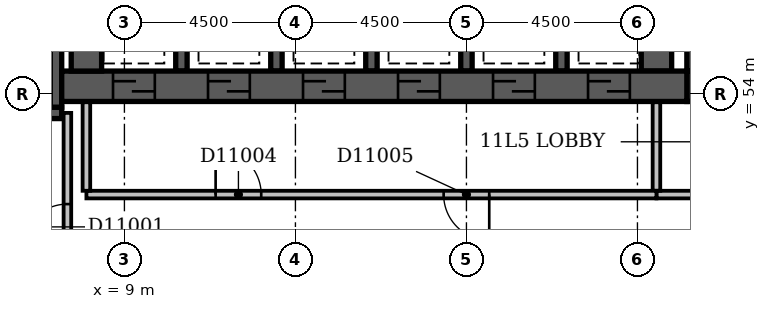
"""IFC4 building model, lengths in metres.
Left out: names, types, materials, properties, quantities, classifications, styles, units other than length and angle.
Written with IfcOpenShell. Run it as: python <this file> out.ifc"""

import sys

from ifc_helpers import new_model, si_unit, direction, frame, frame_2d, origin, place, context, subcontext, project, spatial, rectangle, extrude, element, fill, save


model = new_model("IFC4")
c1 = context("Model", 3, precision=1e-05, world=origin(), true_north=direction((0.0, 1.0)))
c2 = subcontext(c1, "Body", "Model", "MODEL_VIEW")
j1 = project(units=[si_unit("LENGTHUNIT", "METRE"), si_unit("PLANEANGLEUNIT", "RADIAN")], contexts=[c1])
p1 = place(None, origin())
s1 = spatial("IfcSite", under=j1, at=p1, CompositionType="ELEMENT")
p2 = place(p1, origin())
s2 = spatial("IfcBuilding", under=s1, at=p2, CompositionType="ELEMENT")
p3 = place(p2, frame((0.0, 0.0, 50.6)))
s3 = spatial("IfcBuildingStorey", under=s2, at=p3, CompositionType="ELEMENT", Elevation=50.6)
p4 = place(p3, frame((0.35, 53.5, -0.3), z_axis=(0.0, 0.0, 1.0), x_axis=(1.0, 0.0, 0.0)))
e1 = element("IfcWall", 1, at=p4, inside=s3, PredefinedType="SHEAR", context=c2, shape_type="SweptSolid", body=[
    extrude(rectangle(XDim=7.0, YDim=0.3, at=frame_2d((3.5, 0.0))), origin(), (0.0, 0.0, 1.0), 3.6),
])
p5 = place(p4, frame((5.58, 0.0, 0.3)))
e2 = element("IfcOpeningElement", 2, at=p5, cuts=e1, PredefinedType="OPENING", context=c2, shape_type="SweptSolid", body=[
    extrude(rectangle(XDim=1.1, YDim=2.1, at=frame_2d((0.55, 1.05))), frame((0.0, 0.162, 0.0), z_axis=(0.0, -1.0, 0.0), x_axis=(1.0, 0.0, 0.0)), (0.0, 0.0, 1.0), 0.324),
])
p6 = place(p3, frame((7.2, 53.65, -0.3), z_axis=(0.0, 0.0, 1.0), x_axis=(0.0, 1.0, 0.0)))
e3 = element("IfcWall", 3, at=p6, inside=s3, PredefinedType="SHEAR", context=c2, shape_type="SweptSolid", body=[
    extrude(rectangle(XDim=4.2, YDim=0.3, at=frame_2d((2.1, 0.0))), origin(), (0.0, 0.0, 1.0), 3.6),
])
p7 = place(p3, frame((7.35, 54.2, -0.3), z_axis=(0.0, 0.0, 1.0), x_axis=(1.0, 0.0, 0.0)))
e4 = element("IfcWall", 4, at=p7, inside=s3, PredefinedType="SHEAR", context=c2, shape_type="SweptSolid", body=[
    extrude(rectangle(XDim=16.45, YDim=0.8, at=frame_2d((8.225, 0.0))), origin(), (0.0, 0.0, 1.0), 3.6),
])
p8 = place(p7, frame((1.35, 0.0, 0.3)))
e5 = element("IfcOpeningElement", 5, at=p8, cuts=e4, PredefinedType="OPENING", context=c2, shape_type="SweptSolid", body=[
    extrude(rectangle(XDim=1.1, YDim=2.1, at=frame_2d((0.55, 1.05))), frame((0.0, 0.412, 0.0), z_axis=(0.0, -1.0, 0.0), x_axis=(1.0, 0.0, 0.0)), (0.0, 0.0, 1.0), 0.824),
])
p9 = place(p7, frame((3.85, 0.0, 0.3)))
e6 = element("IfcOpeningElement", 6, at=p9, cuts=e4, PredefinedType="OPENING", context=c2, shape_type="SweptSolid", body=[
    extrude(rectangle(XDim=1.1, YDim=2.1, at=frame_2d((0.55, 1.05))), frame((0.0, 0.412, 0.0), z_axis=(0.0, -1.0, 0.0), x_axis=(1.0, 0.0, 0.0)), (0.0, 0.0, 1.0), 0.824),
])
p10 = place(p7, frame((6.35, 0.0, 0.3)))
e7 = element("IfcOpeningElement", 7, at=p10, cuts=e4, PredefinedType="OPENING", context=c2, shape_type="SweptSolid", body=[
    extrude(rectangle(XDim=1.1, YDim=2.1, at=frame_2d((0.55, 1.05))), frame((0.0, 0.412, 0.0), z_axis=(0.0, -1.0, 0.0), x_axis=(1.0, 0.0, 0.0)), (0.0, 0.0, 1.0), 0.824),
])
p11 = place(p7, frame((8.85, 0.0, 0.3)))
e8 = element("IfcOpeningElement", 8, at=p11, cuts=e4, PredefinedType="OPENING", context=c2, shape_type="SweptSolid", body=[
    extrude(rectangle(XDim=1.1, YDim=2.1, at=frame_2d((0.55, 1.05))), frame((0.0, 0.412, 0.0), z_axis=(0.0, -1.0, 0.0), x_axis=(1.0, 0.0, 0.0)), (0.0, 0.0, 1.0), 0.824),
])
p12 = place(p7, frame((11.35, 0.0, 0.3)))
e9 = element("IfcOpeningElement", 9, at=p12, cuts=e4, PredefinedType="OPENING", context=c2, shape_type="SweptSolid", body=[
    extrude(rectangle(XDim=1.1, YDim=2.1, at=frame_2d((0.55, 1.05))), frame((0.0, 0.412, 0.0), z_axis=(0.0, -1.0, 0.0), x_axis=(1.0, 0.0, 0.0)), (0.0, 0.0, 1.0), 0.824),
])
p13 = place(p7, frame((13.85, 0.0, 0.3)))
e10 = element("IfcOpeningElement", 10, at=p13, cuts=e4, PredefinedType="OPENING", context=c2, shape_type="SweptSolid", body=[
    extrude(rectangle(XDim=1.1, YDim=2.1, at=frame_2d((0.55, 1.05))), frame((0.0, 0.412, 0.0), z_axis=(0.0, -1.0, 0.0), x_axis=(1.0, 0.0, 0.0)), (0.0, 0.0, 1.0), 0.824),
])
p14 = place(p3, frame((8.0, 54.6, -0.3), z_axis=(0.0, 0.0, 1.0), x_axis=(0.0, 1.0, 0.0)))
e11 = element("IfcWall", 11, at=p14, inside=s3, PredefinedType="SHEAR", context=c2, shape_type="SweptSolid", body=[
    extrude(rectangle(XDim=3.0, YDim=0.8, at=frame_2d((1.5, 0.0))), origin(), (0.0, 0.0, 1.0), 3.6),
])
for number, where, z_axis, x_axis in (
    (12, (10.5, 54.6, -0.3), (0.0, 0.0, 1.0), (0.0, 1.0, 0.0)),
    (13, (13.0, 54.6, -0.3), (0.0, 0.0, 1.0), (0.0, 1.0, 0.0)),
    (14, (15.5, 54.6, -0.3), (0.0, 0.0, 1.0), (0.0, 1.0, 0.0)),
    (15, (18.0, 54.6, -0.3), (0.0, 0.0, 1.0), (0.0, 1.0, 0.0)),
    (16, (20.5, 54.6, -0.3), (0.0, 0.0, 1.0), (0.0, 1.0, 0.0)),
):
    element("IfcWall", number, at=place(p3, frame(where, z_axis=z_axis, x_axis=x_axis)), inside=s3, PredefinedType="SHEAR", context=c2, shape_type="SweptSolid", body=[
        extrude(rectangle(XDim=3.0, YDim=0.3, at=frame_2d((1.5, 0.0))), origin(), (0.0, 0.0, 1.0), 3.6),
    ])
p15 = place(p3, frame((23.0, 54.6, -0.3), z_axis=(0.0, 0.0, 1.0), x_axis=(0.0, 1.0, 0.0)))
e17 = element("IfcWall", 17, at=p15, inside=s3, PredefinedType="SHEAR", context=c2, shape_type="SweptSolid", body=[
    extrude(rectangle(XDim=3.0, YDim=0.8, at=frame_2d((1.5, 0.0))), origin(), (0.0, 0.0, 1.0), 3.6),
])
p16 = place(p3, frame((23.8, 54.2, -0.3), z_axis=(0.0, 0.0, 1.0), x_axis=(1.0, 0.0, 0.0)))
e18 = element("IfcWall", 18, at=p16, inside=s3, PredefinedType="SHEAR", context=c2, shape_type="SweptSolid", body=[
    extrude(rectangle(XDim=3.3, YDim=0.8, at=frame_2d((1.65, 0.0))), origin(), (0.0, 0.0, 1.0), 3.6),
])
p17 = place(p16, frame((1.1, 0.0, 0.3)))
e19 = element("IfcOpeningElement", 19, at=p17, cuts=e18, PredefinedType="OPENING", context=c2, shape_type="SweptSolid", body=[
    extrude(rectangle(XDim=1.1, YDim=2.1, at=frame_2d((0.55, 1.05))), frame((0.0, 0.412, 0.0), z_axis=(0.0, -1.0, 0.0), x_axis=(1.0, 0.0, 0.0)), (0.0, 0.0, 1.0), 0.824),
])
p18 = place(p3, frame((24.2, 54.6, -0.3), z_axis=(0.0, 0.0, 1.0), x_axis=(0.0, 1.0, 0.0)))
e20 = element("IfcWall", 20, at=p18, inside=s3, PredefinedType="SHEAR", context=c2, shape_type="SweptSolid", body=[
    extrude(rectangle(XDim=3.0, YDim=0.8, at=frame_2d((1.5, 0.0))), origin(), (0.0, 0.0, 1.0), 3.6),
])
p19 = place(p3, frame((8.0, 51.35, 0.0), z_axis=(0.0, 0.0, 1.0), x_axis=(1.0, 0.0, 0.0)))
e21 = element("IfcWall", 21, at=p19, inside=s3, PredefinedType="PARTITIONING", context=c2, shape_type="SweptSolid", body=[
    extrude(rectangle(XDim=15.0, YDim=0.2, at=frame_2d((7.5, 0.0))), origin(), (0.0, 0.0, 1.0), 3.3),
])
p20 = place(p19, frame((3.4, 0.0, 0.0)))
e22 = element("IfcOpeningElement", 22, at=p20, cuts=e21, PredefinedType="OPENING", context=c2, shape_type="SweptSolid", body=[
    extrude(rectangle(XDim=1.2, YDim=2.1, at=frame_2d((0.6, 1.05))), frame((0.0, 0.112, 0.0), z_axis=(0.0, -1.0, 0.0), x_axis=(1.0, 0.0, 0.0)), (0.0, 0.0, 1.0), 0.224),
])
p21 = place(p19, frame((9.4, 0.0, 0.0)))
e23 = element("IfcOpeningElement", 23, at=p21, cuts=e21, PredefinedType="OPENING", context=c2, shape_type="SweptSolid", body=[
    extrude(rectangle(XDim=1.2, YDim=2.1, at=frame_2d((0.6, 1.05))), frame((0.0, 0.112, 0.0), z_axis=(0.0, -1.0, 0.0), x_axis=(1.0, 0.0, 0.0)), (0.0, 0.0, 1.0), 0.224),
])
for number, where, z_axis, x_axis in (
    (24, (23.0, 51.45, 0.0), (0.0, 0.0, 1.0), (0.0, 1.0, 0.0)),
    (25, (8.0, 51.45, 0.0), (0.0, 0.0, 1.0), (0.0, 1.0, 0.0)),
):
    element("IfcWall", number, at=place(p3, frame(where, z_axis=z_axis, x_axis=x_axis)), inside=s3, PredefinedType="PARTITIONING", context=c2, shape_type="SweptSolid", body=[
        extrude(rectangle(XDim=2.33, YDim=0.2, at=frame_2d((1.165, 0.0))), origin(), (0.0, 0.0, 1.0), 3.3),
    ])
p22 = place(p3, frame((23.0, 51.35, 0.0), z_axis=(0.0, 0.0, 1.0), x_axis=(1.0, 0.0, 0.0)))
e26 = element("IfcWall", 26, at=p22, inside=s3, PredefinedType="PARTITIONING", context=c2, shape_type="SweptSolid", body=[
    extrude(rectangle(XDim=4.8, YDim=0.2, at=frame_2d((2.4, 0.0))), origin(), (0.0, 0.0, 1.0), 3.3),
])
p23 = place(p22, frame((1.65, 0.0, 0.0)))
e27 = element("IfcOpeningElement", 27, at=p23, cuts=e26, PredefinedType="OPENING", context=c2, shape_type="SweptSolid", body=[
    extrude(rectangle(XDim=1.2, YDim=2.1, at=frame_2d((0.6, 1.05))), frame((0.0, 0.112, 0.0), z_axis=(0.0, -1.0, 0.0), x_axis=(1.0, 0.0, 0.0)), (0.0, 0.0, 1.0), 0.224),
])
p24 = place(p3, frame((7.5, 49.6, 0.0), z_axis=(0.0, 0.0, 1.0), x_axis=(0.0, 1.0, 0.0)))
e28 = element("IfcWall", 28, at=p24, inside=s3, PredefinedType="PARTITIONING", context=c2, shape_type="SweptSolid", body=[
    extrude(rectangle(XDim=3.9, YDim=0.2, at=frame_2d((1.95, 0.0))), origin(), (0.0, 0.0, 1.0), 3.3),
])
p25 = place(p24, frame((0.3, 0.0, 0.0)))
e29 = element("IfcOpeningElement", 29, at=p25, cuts=e28, PredefinedType="OPENING", context=c2, shape_type="SweptSolid", body=[
    extrude(rectangle(XDim=1.2, YDim=2.1, at=frame_2d((0.6, 1.05))), frame((0.0, 0.112, 0.0), z_axis=(0.0, -1.0, 0.0), x_axis=(1.0, 0.0, 0.0)), (0.0, 0.0, 1.0), 0.224),
])
p26 = place(p25, origin())
e30 = element("IfcDoor", 30, at=p26, inside=s3, OperationType="SINGLE_SWING_LEFT", PredefinedType="DOOR", context=c2, shape_type="SweptSolid", body=[
    extrude(rectangle(XDim=1.2, YDim=2.1, at=frame_2d((0.6, 1.05))), frame((0.0, 0.025, 0.0), z_axis=(0.0, -1.0, 0.0), x_axis=(1.0, 0.0, 0.0)), (0.0, 0.0, 1.0), 0.05),
])
fill(e29, e30)
p27 = place(p8, origin())
e31 = element("IfcDoor", 31, at=p27, inside=s3, OperationType="SLIDING_TO_LEFT", PredefinedType="DOOR", context=c2, shape_type="SweptSolid", body=[
    extrude(rectangle(XDim=1.1, YDim=2.1, at=frame_2d((0.55, 1.05))), frame((0.0, 0.025, 0.0), z_axis=(0.0, -1.0, 0.0), x_axis=(1.0, 0.0, 0.0)), (0.0, 0.0, 1.0), 0.05),
])
fill(e5, e31)
p28 = place(p9, origin())
e32 = element("IfcDoor", 32, at=p28, inside=s3, OperationType="SLIDING_TO_LEFT", PredefinedType="DOOR", context=c2, shape_type="SweptSolid", body=[
    extrude(rectangle(XDim=1.1, YDim=2.1, at=frame_2d((0.55, 1.05))), frame((0.0, 0.025, 0.0), z_axis=(0.0, -1.0, 0.0), x_axis=(1.0, 0.0, 0.0)), (0.0, 0.0, 1.0), 0.05),
])
fill(e6, e32)
p29 = place(p10, origin())
e33 = element("IfcDoor", 33, at=p29, inside=s3, OperationType="SLIDING_TO_LEFT", PredefinedType="DOOR", context=c2, shape_type="SweptSolid", body=[
    extrude(rectangle(XDim=1.1, YDim=2.1, at=frame_2d((0.55, 1.05))), frame((0.0, 0.025, 0.0), z_axis=(0.0, -1.0, 0.0), x_axis=(1.0, 0.0, 0.0)), (0.0, 0.0, 1.0), 0.05),
])
fill(e7, e33)
p30 = place(p11, origin())
e34 = element("IfcDoor", 34, at=p30, inside=s3, OperationType="SLIDING_TO_LEFT", PredefinedType="DOOR", context=c2, shape_type="SweptSolid", body=[
    extrude(rectangle(XDim=1.1, YDim=2.1, at=frame_2d((0.55, 1.05))), frame((0.0, 0.025, 0.0), z_axis=(0.0, -1.0, 0.0), x_axis=(1.0, 0.0, 0.0)), (0.0, 0.0, 1.0), 0.05),
])
fill(e8, e34)
p31 = place(p12, origin())
e35 = element("IfcDoor", 35, at=p31, inside=s3, OperationType="SLIDING_TO_LEFT", PredefinedType="DOOR", context=c2, shape_type="SweptSolid", body=[
    extrude(rectangle(XDim=1.1, YDim=2.1, at=frame_2d((0.55, 1.05))), frame((0.0, 0.025, 0.0), z_axis=(0.0, -1.0, 0.0), x_axis=(1.0, 0.0, 0.0)), (0.0, 0.0, 1.0), 0.05),
])
fill(e9, e35)
p32 = place(p13, origin())
e36 = element("IfcDoor", 36, at=p32, inside=s3, OperationType="SLIDING_TO_LEFT", PredefinedType="DOOR", context=c2, shape_type="SweptSolid", body=[
    extrude(rectangle(XDim=1.1, YDim=2.1, at=frame_2d((0.55, 1.05))), frame((0.0, 0.025, 0.0), z_axis=(0.0, -1.0, 0.0), x_axis=(1.0, 0.0, 0.0)), (0.0, 0.0, 1.0), 0.05),
])
fill(e10, e36)
p33 = place(p20, origin())
e37 = element("IfcDoor", 37, at=p33, inside=s3, OperationType="SINGLE_SWING_LEFT", PredefinedType="DOOR", context=c2, shape_type="SweptSolid", body=[
    extrude(rectangle(XDim=1.2, YDim=2.1, at=frame_2d((0.6, 1.05))), frame((0.0, 0.025, 0.0), z_axis=(0.0, -1.0, 0.0), x_axis=(1.0, 0.0, 0.0)), (0.0, 0.0, 1.0), 0.05),
])
fill(e22, e37)
p34 = place(p21, origin())
e38 = element("IfcDoor", 38, at=p34, inside=s3, OperationType="SINGLE_SWING_RIGHT", PredefinedType="DOOR", context=c2, shape_type="SweptSolid", body=[
    extrude(rectangle(XDim=1.2, YDim=2.1, at=frame_2d((0.6, 1.05))), frame((0.0, 0.025, 0.0), z_axis=(0.0, -1.0, 0.0), x_axis=(1.0, 0.0, 0.0)), (0.0, 0.0, 1.0), 0.05),
])
fill(e23, e38)
save(model, sys.argv[1])
